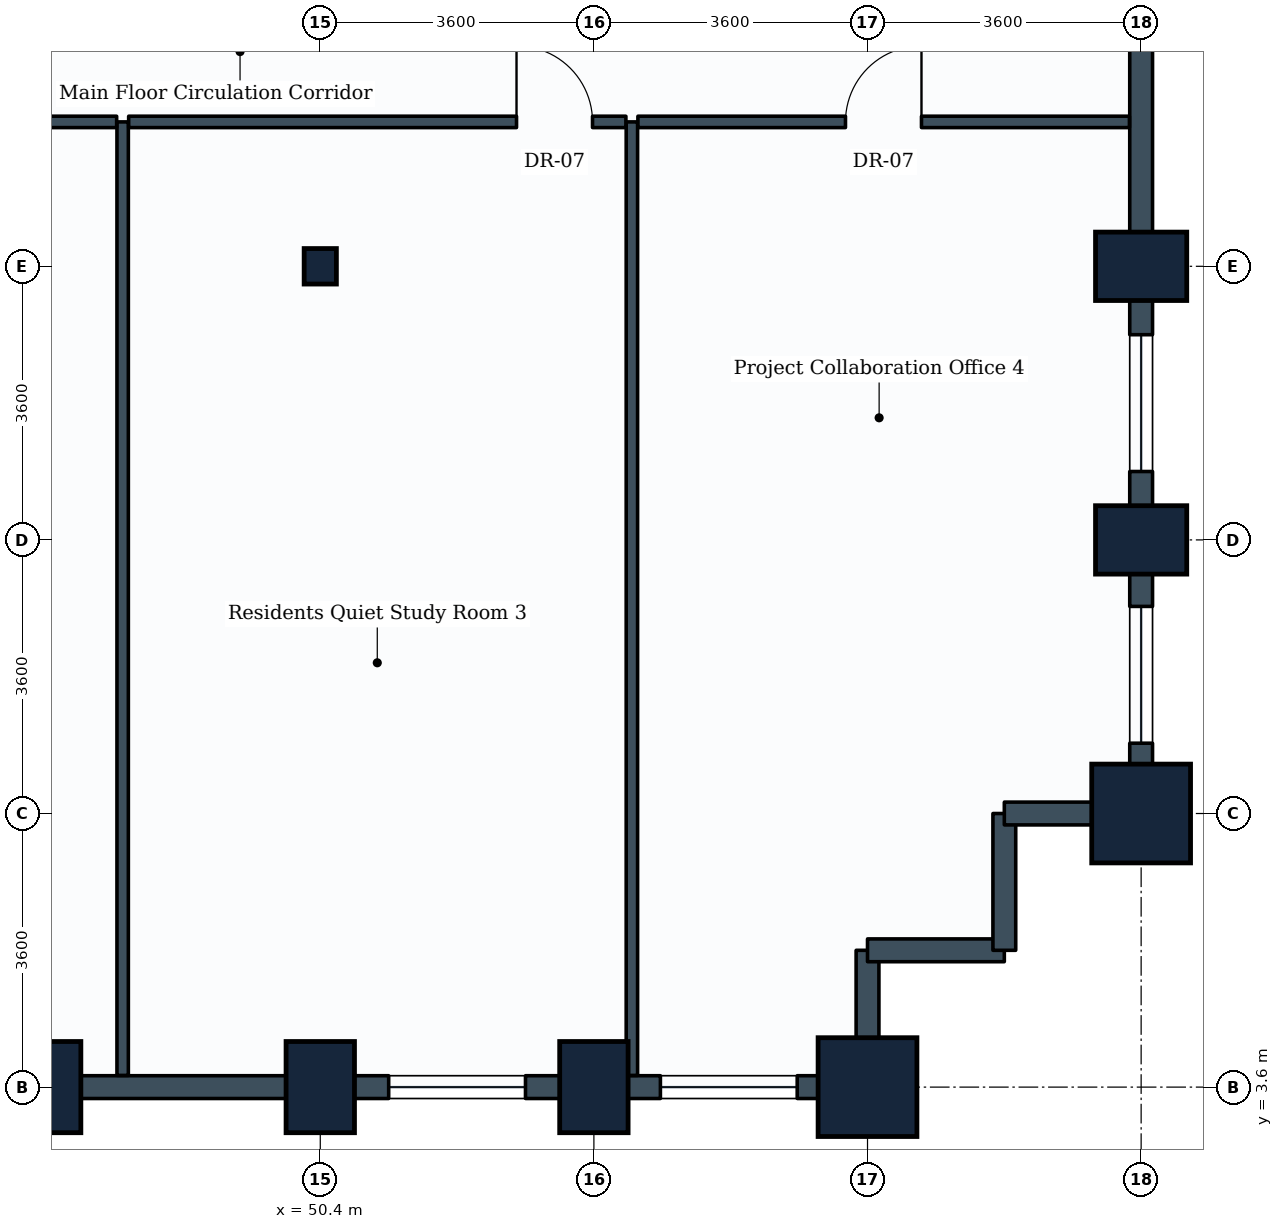
"""IFC4 building model, lengths in metres.
Left out: names, types, materials, properties, quantities, classifications, styles, units other than length and angle.
Written with IfcOpenShell. Run it as: python <this file> out.ifc"""

import sys

from ifc_helpers import new_model, si_unit, direction, frame, frame_2d, origin, origin_2d, place, context, subcontext, project, spatial, rectangle, i_section, extrude, element, fill, save


model = new_model("IFC4")
c1 = context("Model", 3, precision=1e-05, world=origin(), true_north=direction((0.0, 1.0)))
c2 = subcontext(c1, "Body", "Model", "MODEL_VIEW")
j1 = project(units=[si_unit("LENGTHUNIT", "METRE"), si_unit("PLANEANGLEUNIT", "RADIAN")], contexts=[c1])
p1 = place(None, origin())
s1 = spatial("IfcSite", under=j1, at=p1, CompositionType="ELEMENT")
p2 = place(p1, origin())
s2 = spatial("IfcBuilding", under=s1, at=p2, CompositionType="ELEMENT")
p3 = place(p2, frame((0.0, 0.0, 39.6)))
s3 = spatial("IfcBuildingStorey", under=s2, at=p3, CompositionType="ELEMENT", Elevation=39.6)
for number, where, z_axis, x_axis in (
    (1, (46.8, 3.6, 0.0), (0.0, 0.0, 1.0), (1.0, 0.0, 0.0)),
    (2, (50.4, 3.6, 0.0), (0.0, 0.0, 1.0), (1.0, 0.0, 0.0)),
):
    element("IfcColumn", number, at=place(p3, frame(where, z_axis=z_axis, x_axis=x_axis)), inside=s3, PredefinedType="COLUMN", context=c2, shape_type="SweptSolid", body=[
        extrude(rectangle(XDim=0.9, YDim=1.2, at=origin_2d()), origin(), (0.0, 0.0, 1.0), 3.9),
    ])
p4 = place(p3, frame((50.4, 14.4, 0.0), z_axis=(0.0, 0.0, 1.0), x_axis=(1.0, 0.0, 0.0)))
e3 = element("IfcColumn", 3, at=p4, inside=s3, PredefinedType="COLUMN", context=c2, shape_type="SweptSolid", body=[
    extrude(i_section(OverallWidth=0.424, OverallDepth=0.467, WebThickness=0.033, FlangeThickness=0.053, FilletRadius=0.015, at=origin_2d()), origin(), (0.0, 0.0, 1.0), 3.9),
])
p5 = place(p3, frame((54.0, 3.6, 0.0), z_axis=(0.0, 0.0, 1.0), x_axis=(1.0, 0.0, 0.0)))
e4 = element("IfcColumn", 4, at=p5, inside=s3, PredefinedType="COLUMN", context=c2, shape_type="SweptSolid", body=[
    extrude(rectangle(XDim=0.9, YDim=1.2, at=origin_2d()), origin(), (0.0, 0.0, 1.0), 3.9),
])
for number, where, z_axis, x_axis in (
    (5, (57.6, 3.6, 0.0), (0.0, 0.0, 1.0), (1.0, 0.0, 0.0)),
    (6, (61.2, 7.2, 0.0), (0.0, 0.0, 1.0), (1.0, 0.0, 0.0)),
):
    element("IfcColumn", number, at=place(p3, frame(where, z_axis=z_axis, x_axis=x_axis)), inside=s3, PredefinedType="COLUMN", context=c2, shape_type="SweptSolid", body=[
        extrude(rectangle(XDim=1.3, YDim=1.3, at=origin_2d()), origin(), (0.0, 0.0, 1.0), 3.9),
    ])
for number, where, z_axis, x_axis in (
    (7, (61.2, 10.8, 0.0), (0.0, 0.0, 1.0), (0.0, 1.0, 0.0)),
    (8, (61.2, 14.4, 0.0), (0.0, 0.0, 1.0), (0.0, 1.0, 0.0)),
):
    element("IfcColumn", number, at=place(p3, frame(where, z_axis=z_axis, x_axis=x_axis)), inside=s3, PredefinedType="COLUMN", context=c2, shape_type="SweptSolid", body=[
        extrude(rectangle(XDim=0.9, YDim=1.2, at=origin_2d()), origin(), (0.0, 0.0, 1.0), 3.9),
    ])
p6 = place(p3, frame((50.4, 3.6, 0.0), z_axis=(0.0, 0.0, 1.0), x_axis=(-1.0, 0.0, 0.0)))
e9 = element("IfcWall", 9, at=p6, inside=s3, PredefinedType="STANDARD", context=c2, shape_type="SweptSolid", body=[
    extrude(rectangle(XDim=3.6, YDim=0.3, at=frame_2d((1.8, 0.0))), origin(), (0.0, 0.0, 1.0), 2.93),
])
p7 = place(p3, frame((54.0, 3.6, 0.0), z_axis=(0.0, 0.0, 1.0), x_axis=(-1.0, 0.0, 0.0)))
e10 = element("IfcWall", 10, at=p7, inside=s3, PredefinedType="STANDARD", context=c2, shape_type="SweptSolid", body=[
    extrude(rectangle(XDim=3.6, YDim=0.3, at=frame_2d((1.8, 0.0))), origin(), (0.0, 0.0, 1.0), 2.93),
])
p8 = place(p7, frame((0.9, 0.0, 0.85)))
e11 = element("IfcOpeningElement", 11, at=p8, cuts=e10, PredefinedType="OPENING", context=c2, shape_type="SweptSolid", body=[
    extrude(rectangle(XDim=1.8, YDim=1.35, at=frame_2d((0.9, 0.675))), frame((0.0, 0.16, 0.0), z_axis=(0.0, -1.0, 0.0), x_axis=(1.0, 0.0, 0.0)), (0.0, 0.0, 1.0), 0.32),
])
p9 = place(p3, frame((57.6, 3.6, 0.0), z_axis=(0.0, 0.0, 1.0), x_axis=(-1.0, 0.0, 0.0)))
e12 = element("IfcWall", 12, at=p9, inside=s3, PredefinedType="STANDARD", context=c2, shape_type="SweptSolid", body=[
    extrude(rectangle(XDim=3.6, YDim=0.3, at=frame_2d((1.8, 0.0))), origin(), (0.0, 0.0, 1.0), 2.93),
])
p10 = place(p9, frame((0.925, 0.0, 0.85)))
e13 = element("IfcOpeningElement", 13, at=p10, cuts=e12, PredefinedType="OPENING", context=c2, shape_type="SweptSolid", body=[
    extrude(rectangle(XDim=1.8, YDim=1.35, at=frame_2d((0.9, 0.675))), frame((0.0, 0.16, 0.0), z_axis=(0.0, -1.0, 0.0), x_axis=(1.0, 0.0, 0.0)), (0.0, 0.0, 1.0), 0.32),
])
p11 = place(p3, frame((57.6, 5.4, 0.0), z_axis=(0.0, 0.0, 1.0), x_axis=(0.0, -1.0, 0.0)))
e14 = element("IfcWall", 14, at=p11, inside=s3, PredefinedType="STANDARD", context=c2, shape_type="SweptSolid", body=[
    extrude(rectangle(XDim=1.8, YDim=0.3, at=frame_2d((0.9, 0.0))), origin(), (0.0, 0.0, 1.0), 2.93),
])
p12 = place(p3, frame((59.4, 5.4, 0.0), z_axis=(0.0, 0.0, 1.0), x_axis=(-1.0, 0.0, 0.0)))
e15 = element("IfcWall", 15, at=p12, inside=s3, PredefinedType="STANDARD", context=c2, shape_type="SweptSolid", body=[
    extrude(rectangle(XDim=1.8, YDim=0.3, at=frame_2d((0.9, 0.0))), origin(), (0.0, 0.0, 1.0), 3.635),
])
p13 = place(p3, frame((59.4, 7.2, 0.0), z_axis=(0.0, 0.0, 1.0), x_axis=(0.0, -1.0, 0.0)))
e16 = element("IfcWall", 16, at=p13, inside=s3, PredefinedType="STANDARD", context=c2, shape_type="SweptSolid", body=[
    extrude(rectangle(XDim=1.8, YDim=0.3, at=frame_2d((0.9, 0.0))), origin(), (0.0, 0.0, 1.0), 3.635),
])
p14 = place(p3, frame((61.2, 7.2, 0.0), z_axis=(0.0, 0.0, 1.0), x_axis=(-1.0, 0.0, 0.0)))
e17 = element("IfcWall", 17, at=p14, inside=s3, PredefinedType="STANDARD", context=c2, shape_type="SweptSolid", body=[
    extrude(rectangle(XDim=1.8, YDim=0.3, at=frame_2d((0.9, 0.0))), origin(), (0.0, 0.0, 1.0), 2.93),
])
p15 = place(p3, frame((61.2, 10.8, 0.0), z_axis=(0.0, 0.0, 1.0), x_axis=(0.0, -1.0, 0.0)))
e18 = element("IfcWall", 18, at=p15, inside=s3, PredefinedType="STANDARD", context=c2, shape_type="SweptSolid", body=[
    extrude(rectangle(XDim=3.6, YDim=0.3, at=frame_2d((1.8, 0.0))), origin(), (0.0, 0.0, 1.0), 2.93),
])
p16 = place(p15, frame((0.875, 0.0, 0.85)))
e19 = element("IfcOpeningElement", 19, at=p16, cuts=e18, PredefinedType="OPENING", context=c2, shape_type="SweptSolid", body=[
    extrude(rectangle(XDim=1.8, YDim=1.35, at=frame_2d((0.9, 0.675))), frame((0.0, 0.16, 0.0), z_axis=(0.0, -1.0, 0.0), x_axis=(1.0, 0.0, 0.0)), (0.0, 0.0, 1.0), 0.32),
])
p17 = place(p3, frame((61.2, 14.4, 0.0), z_axis=(0.0, 0.0, 1.0), x_axis=(0.0, -1.0, 0.0)))
e20 = element("IfcWall", 20, at=p17, inside=s3, PredefinedType="STANDARD", context=c2, shape_type="SweptSolid", body=[
    extrude(rectangle(XDim=3.6, YDim=0.3, at=frame_2d((1.8, 0.0))), origin(), (0.0, 0.0, 1.0), 2.93),
])
p18 = place(p17, frame((0.9, 0.0, 0.85)))
e21 = element("IfcOpeningElement", 21, at=p18, cuts=e20, PredefinedType="OPENING", context=c2, shape_type="SweptSolid", body=[
    extrude(rectangle(XDim=1.8, YDim=1.35, at=frame_2d((0.9, 0.675))), frame((0.0, 0.16, 0.0), z_axis=(0.0, -1.0, 0.0), x_axis=(1.0, 0.0, 0.0)), (0.0, 0.0, 1.0), 0.32),
])
p19 = place(p3, frame((61.2, 18.0, 0.0), z_axis=(0.0, 0.0, 1.0), x_axis=(0.0, -1.0, 0.0)))
e22 = element("IfcWall", 22, at=p19, inside=s3, PredefinedType="STANDARD", context=c2, shape_type="SweptSolid", body=[
    extrude(rectangle(XDim=3.6, YDim=0.3, at=frame_2d((1.8, 0.0))), origin(), (0.0, 0.0, 1.0), 2.93),
])
p20 = place(p3, frame((47.8, 3.754, 0.0), z_axis=(0.0, 0.0, 1.0), x_axis=(0.0, 1.0, 0.0)))
e23 = element("IfcWall", 23, at=p20, inside=s3, PredefinedType="PARTITIONING", context=c2, shape_type="SweptSolid", body=[
    extrude(rectangle(XDim=12.546, YDim=0.15, at=frame_2d((6.273, 0.0))), origin(), (0.0, 0.0, 1.0), 2.93),
])
p21 = place(p3, frame((41.179, 16.3, 0.0), z_axis=(0.0, 0.0, 1.0), x_axis=(1.0, 0.0, 0.0)))
e24 = element("IfcWall", 24, at=p21, inside=s3, PredefinedType="PARTITIONING", context=c2, shape_type="SweptSolid", body=[
    extrude(rectangle(XDim=6.542, YDim=0.15, at=frame_2d((3.271, 0.0))), origin(), (0.0, 0.0, 1.0), 3.04),
])
p22 = place(p21, frame((4.55, 0.0, 0.0)))
e25 = element("IfcOpeningElement", 25, at=p22, cuts=e24, PredefinedType="OPENING", context=c2, shape_type="SweptSolid", body=[
    extrude(rectangle(XDim=1.0, YDim=2.1, at=frame_2d((0.5, 1.05))), frame((0.0, 0.085, 0.0), z_axis=(0.0, -1.0, 0.0), x_axis=(1.0, 0.0, 0.0)), (0.0, 0.0, 1.0), 0.17),
])
p23 = place(p3, frame((54.5, 3.754, 0.0), z_axis=(0.0, 0.0, 1.0), x_axis=(0.0, 1.0, 0.0)))
e26 = element("IfcWall", 26, at=p23, inside=s3, PredefinedType="PARTITIONING", context=c2, shape_type="SweptSolid", body=[
    extrude(rectangle(XDim=12.546, YDim=0.15, at=frame_2d((6.273, 0.0))), origin(), (0.0, 0.0, 1.0), 2.93),
])
p24 = place(p3, frame((47.879, 16.3, 0.0), z_axis=(0.0, 0.0, 1.0), x_axis=(1.0, 0.0, 0.0)))
e27 = element("IfcWall", 27, at=p24, inside=s3, PredefinedType="PARTITIONING", context=c2, shape_type="SweptSolid", body=[
    extrude(rectangle(XDim=6.542, YDim=0.15, at=frame_2d((3.271, 0.0))), origin(), (0.0, 0.0, 1.0), 3.04),
])
p25 = place(p24, frame((5.103, 0.0, 0.0)))
e28 = element("IfcOpeningElement", 28, at=p25, cuts=e27, PredefinedType="OPENING", context=c2, shape_type="SweptSolid", body=[
    extrude(rectangle(XDim=1.0, YDim=2.1, at=frame_2d((0.5, 1.05))), frame((0.0, 0.085, 0.0), z_axis=(0.0, -1.0, 0.0), x_axis=(1.0, 0.0, 0.0)), (0.0, 0.0, 1.0), 0.17),
])
p26 = place(p3, frame((54.579, 16.3, 0.0), z_axis=(0.0, 0.0, 1.0), x_axis=(1.0, 0.0, 0.0)))
e29 = element("IfcWall", 29, at=p26, inside=s3, PredefinedType="PARTITIONING", context=c2, shape_type="SweptSolid", body=[
    extrude(rectangle(XDim=6.467, YDim=0.15, at=frame_2d((3.233, 0.0))), origin(), (0.0, 0.0, 1.0), 2.93),
])
p27 = place(p26, frame((2.731, 0.0, 0.0)))
e30 = element("IfcOpeningElement", 30, at=p27, cuts=e29, PredefinedType="OPENING", context=c2, shape_type="SweptSolid", body=[
    extrude(rectangle(XDim=1.0, YDim=2.1, at=frame_2d((0.5, 1.05))), frame((0.0, 0.085, 0.0), z_axis=(0.0, -1.0, 0.0), x_axis=(1.0, 0.0, 0.0)), (0.0, 0.0, 1.0), 0.17),
])
p28 = place(p8, origin())
e31 = element("IfcWindow", 31, at=p28, inside=s3, PartitioningType="SINGLE_PANEL", PredefinedType="WINDOW", context=c2, shape_type="SweptSolid", body=[
    extrude(rectangle(XDim=1.8, YDim=1.35, at=frame_2d((0.9, 0.675))), frame((0.0, 0.03, 0.0), z_axis=(0.0, -1.0, 0.0), x_axis=(1.0, 0.0, 0.0)), (0.0, 0.0, 1.0), 0.06),
])
fill(e11, e31)
p29 = place(p10, origin())
e32 = element("IfcWindow", 32, at=p29, inside=s3, PartitioningType="SINGLE_PANEL", PredefinedType="WINDOW", context=c2, shape_type="SweptSolid", body=[
    extrude(rectangle(XDim=1.8, YDim=1.35, at=frame_2d((0.9, 0.675))), frame((0.0, 0.03, 0.0), z_axis=(0.0, -1.0, 0.0), x_axis=(1.0, 0.0, 0.0)), (0.0, 0.0, 1.0), 0.06),
])
fill(e13, e32)
p30 = place(p16, origin())
e33 = element("IfcWindow", 33, at=p30, inside=s3, PartitioningType="SINGLE_PANEL", PredefinedType="WINDOW", context=c2, shape_type="SweptSolid", body=[
    extrude(rectangle(XDim=1.8, YDim=1.35, at=frame_2d((0.9, 0.675))), frame((0.0, 0.03, 0.0), z_axis=(0.0, -1.0, 0.0), x_axis=(1.0, 0.0, 0.0)), (0.0, 0.0, 1.0), 0.06),
])
fill(e19, e33)
p31 = place(p18, origin())
e34 = element("IfcWindow", 34, at=p31, inside=s3, PartitioningType="SINGLE_PANEL", PredefinedType="WINDOW", context=c2, shape_type="SweptSolid", body=[
    extrude(rectangle(XDim=1.8, YDim=1.35, at=frame_2d((0.9, 0.675))), frame((0.0, 0.03, 0.0), z_axis=(0.0, -1.0, 0.0), x_axis=(1.0, 0.0, 0.0)), (0.0, 0.0, 1.0), 0.06),
])
fill(e21, e34)
p32 = place(p25, origin())
e35 = element("IfcDoor", 35, at=p32, inside=s3, OperationType="SINGLE_SWING_LEFT", PredefinedType="DOOR", context=c2, shape_type="SweptSolid", body=[
    extrude(rectangle(XDim=1.0, YDim=2.1, at=frame_2d((0.5, 1.05))), frame((0.0, 0.025, 0.0), z_axis=(0.0, -1.0, 0.0), x_axis=(1.0, 0.0, 0.0)), (0.0, 0.0, 1.0), 0.05),
])
fill(e28, e35)
p33 = place(p27, origin())
e36 = element("IfcDoor", 36, at=p33, inside=s3, OperationType="SINGLE_SWING_RIGHT", PredefinedType="DOOR", context=c2, shape_type="SweptSolid", body=[
    extrude(rectangle(XDim=1.0, YDim=2.1, at=frame_2d((0.5, 1.05))), frame((0.0, 0.025, 0.0), z_axis=(0.0, -1.0, 0.0), x_axis=(1.0, 0.0, 0.0)), (0.0, 0.0, 1.0), 0.05),
])
fill(e30, e36)
save(model, sys.argv[1])
